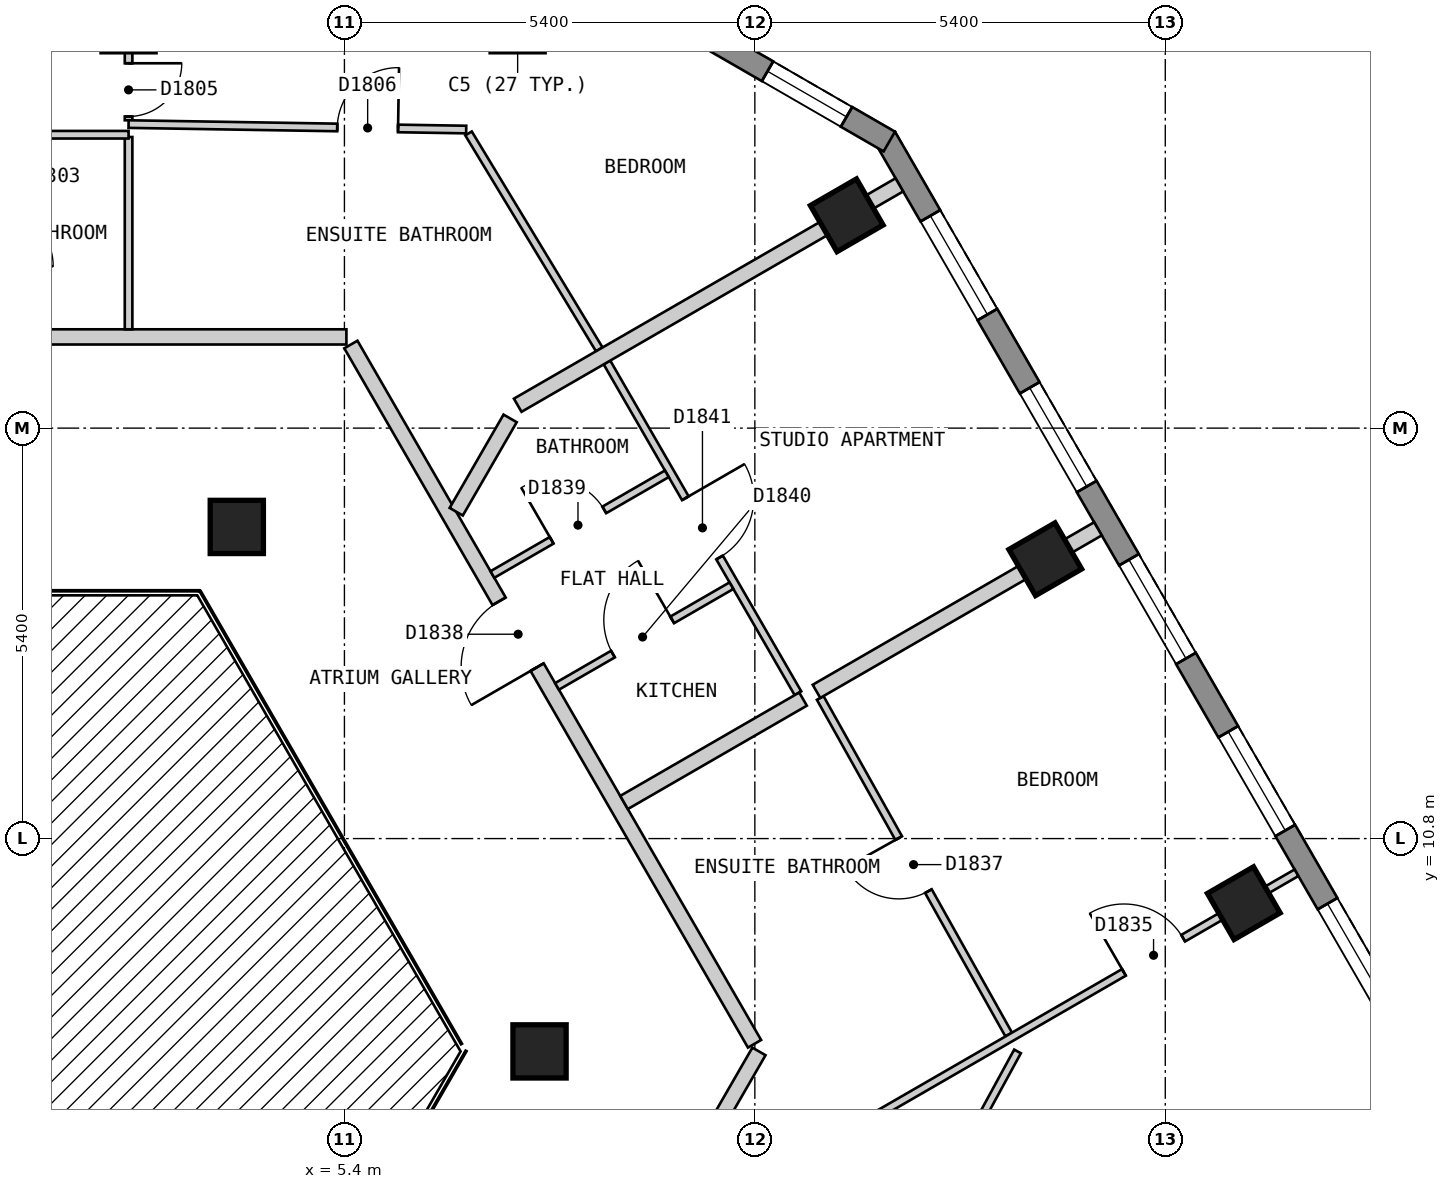
"""IFC4 building model, lengths in metres.
Left out: names, types, materials, properties, quantities, classifications, styles, units other than length and angle.
Written with IfcOpenShell. Run it as: python <this file> out.ifc"""

import sys

from ifc_helpers import new_model, si_unit, direction, frame, frame_2d, origin, origin_2d, place, context, subcontext, project, spatial, polyline, rectangle, outline, extrude, element, fill, save


model = new_model("IFC4")
c1 = context("Model", 3, precision=1e-05, world=origin(), true_north=direction((0.0, 1.0)))
c2 = subcontext(c1, "Body", "Model", "MODEL_VIEW")
j1 = project(units=[si_unit("LENGTHUNIT", "METRE"), si_unit("PLANEANGLEUNIT", "RADIAN")], contexts=[c1])
p1 = place(None, origin())
s1 = spatial("IfcSite", under=j1, at=p1, CompositionType="ELEMENT")
p2 = place(p1, origin())
s2 = spatial("IfcBuilding", under=s1, at=p2, CompositionType="ELEMENT")
p3 = place(p2, frame((0.0, 0.0, 208.8)))
s3 = spatial("IfcBuildingStorey", under=s2, at=p3, CompositionType="ELEMENT", Elevation=208.8)
for number, where, z_axis, x_axis in (
    (1, (17.233, 9.95, 0.0), (0.0, 0.0, 1.0), (-0.5, 0.866, 0.0)),
    (2, (14.621, 14.475, 0.0), (0.0, 0.0, 1.0), (-0.5, 0.866, 0.0)),
    (3, (12.009, 19.0, 0.0), (0.0, 0.0, 1.0), (-0.5, 0.866, 0.0)),
    (4, (7.967, 8.0, 0.0), (0.0, 0.0, 1.0), (1.0, 0.0, 0.0)),
    (5, (3.984, 14.9, 0.0), (0.0, 0.0, 1.0), (1.0, 0.0, 0.0)),
):
    element("IfcColumn", number, at=place(p3, frame(where, z_axis=z_axis, x_axis=x_axis)), inside=s3, PredefinedType="COLUMN", context=c2, shape_type="SweptSolid", body=[
        extrude(rectangle(XDim=0.7, YDim=0.7, at=origin_2d()), origin(), (0.0, 0.0, 1.0), 3.0),
    ])
p4 = place(p3, frame((23.599, 0.825, 0.0), z_axis=(0.0, 0.0, 1.0), x_axis=(-0.500003656944, 0.866023292436, 0.0)))
e6 = element("IfcWall", 6, at=p4, inside=s3, PredefinedType="SOLIDWALL", context=c2, shape_type="SweptSolid", body=[
    extrude(outline(polyline([(0.0, -0.15), (22.17, -0.15), (22.09, 0.15), (0.08, 0.15), (0.0, -0.15)])), origin(), (0.0, 0.0, 1.0), 2.7),
])
p5 = place(p4, frame((1.191, 0.0, 0.15)))
e7 = element("IfcOpeningElement", 7, at=p5, cuts=e6, PredefinedType="OPENING", context=c2, shape_type="SweptSolid", body=[
    extrude(rectangle(XDim=1.5, YDim=2.1, at=frame_2d((0.75, 1.05))), frame((0.0, 0.16, 0.0), z_axis=(0.0, -1.0, 0.0), x_axis=(1.0, 0.0, 0.0)), (0.0, 0.0, 1.0), 0.32),
])
p6 = place(p4, frame((3.804, 0.0, 0.15)))
e8 = element("IfcOpeningElement", 8, at=p6, cuts=e6, PredefinedType="OPENING", context=c2, shape_type="SweptSolid", body=[
    extrude(rectangle(XDim=1.5, YDim=2.1, at=frame_2d((0.75, 1.05))), frame((0.0, 0.16, 0.0), z_axis=(0.0, -1.0, 0.0), x_axis=(1.0, 0.0, 0.0)), (0.0, 0.0, 1.0), 0.32),
])
p7 = place(p4, frame((6.417, 0.0, 0.15)))
e9 = element("IfcOpeningElement", 9, at=p7, cuts=e6, PredefinedType="OPENING", context=c2, shape_type="SweptSolid", body=[
    extrude(rectangle(XDim=1.5, YDim=2.1, at=frame_2d((0.75, 1.05))), frame((0.0, 0.16, 0.0), z_axis=(0.0, -1.0, 0.0), x_axis=(1.0, 0.0, 0.0)), (0.0, 0.0, 1.0), 0.32),
])
p8 = place(p4, frame((9.029, 0.0, 0.15)))
e10 = element("IfcOpeningElement", 10, at=p8, cuts=e6, PredefinedType="OPENING", context=c2, shape_type="SweptSolid", body=[
    extrude(rectangle(XDim=1.5, YDim=2.1, at=frame_2d((0.75, 1.05))), frame((0.0, 0.16, 0.0), z_axis=(0.0, -1.0, 0.0), x_axis=(1.0, 0.0, 0.0)), (0.0, 0.0, 1.0), 0.32),
])
p9 = place(p4, frame((11.641, 0.0, 0.15)))
e11 = element("IfcOpeningElement", 11, at=p9, cuts=e6, PredefinedType="OPENING", context=c2, shape_type="SweptSolid", body=[
    extrude(rectangle(XDim=1.5, YDim=2.1, at=frame_2d((0.75, 1.05))), frame((0.0, 0.16, 0.0), z_axis=(0.0, -1.0, 0.0), x_axis=(1.0, 0.0, 0.0)), (0.0, 0.0, 1.0), 0.32),
])
p10 = place(p4, frame((14.254, 0.0, 0.15)))
e12 = element("IfcOpeningElement", 12, at=p10, cuts=e6, PredefinedType="OPENING", context=c2, shape_type="SweptSolid", body=[
    extrude(rectangle(XDim=1.5, YDim=2.1, at=frame_2d((0.75, 1.05))), frame((0.0, 0.16, 0.0), z_axis=(0.0, -1.0, 0.0), x_axis=(1.0, 0.0, 0.0)), (0.0, 0.0, 1.0), 0.32),
])
p11 = place(p4, frame((16.866, 0.0, 0.15)))
e13 = element("IfcOpeningElement", 13, at=p11, cuts=e6, PredefinedType="OPENING", context=c2, shape_type="SweptSolid", body=[
    extrude(rectangle(XDim=1.5, YDim=2.1, at=frame_2d((0.75, 1.05))), frame((0.0, 0.16, 0.0), z_axis=(0.0, -1.0, 0.0), x_axis=(1.0, 0.0, 0.0)), (0.0, 0.0, 1.0), 0.32),
])
p12 = place(p4, frame((19.479, 0.0, 0.15)))
e14 = element("IfcOpeningElement", 14, at=p12, cuts=e6, PredefinedType="OPENING", context=c2, shape_type="SweptSolid", body=[
    extrude(rectangle(XDim=1.5, YDim=2.1, at=frame_2d((0.75, 1.05))), frame((0.0, 0.16, 0.0), z_axis=(0.0, -1.0, 0.0), x_axis=(1.0, 0.0, 0.0)), (0.0, 0.0, 1.0), 0.32),
])
p13 = place(p3, frame((12.569, 19.97, 0.0), z_axis=(0.0, 0.0, 1.0), x_axis=(-0.866022959057, 0.500004234368, 0.0)))
e15 = element("IfcWall", 15, at=p13, inside=s3, PredefinedType="SOLIDWALL", context=c2, shape_type="SweptSolid", body=[
    extrude(outline(polyline([(0.0, -0.15), (5.0, -0.15), (4.92, 0.15), (0.08, 0.15), (0.0, -0.15)])), origin(), (0.0, 0.0, 1.0), 2.7),
])
p14 = place(p13, frame((0.65, 0.0, 0.15)))
e16 = element("IfcOpeningElement", 16, at=p14, cuts=e15, PredefinedType="OPENING", context=c2, shape_type="SweptSolid", body=[
    extrude(rectangle(XDim=1.2, YDim=2.1, at=frame_2d((0.6, 1.05))), frame((0.0, 0.16, 0.0), z_axis=(0.0, -1.0, 0.0), x_axis=(1.0, 0.0, 0.0)), (0.0, 0.0, 1.0), 0.32),
])
p15 = place(p13, frame((3.15, 0.0, 0.15)))
e17 = element("IfcOpeningElement", 17, at=p15, cuts=e15, PredefinedType="OPENING", context=c2, shape_type="SweptSolid", body=[
    extrude(rectangle(XDim=1.2, YDim=2.1, at=frame_2d((0.6, 1.05))), frame((0.0, 0.16, 0.0), z_axis=(0.0, -1.0, 0.0), x_axis=(1.0, 0.0, 0.0)), (0.0, 0.0, 1.0), 0.32),
])
p16 = place(p3, frame((5.485, 17.3, 0.0), z_axis=(0.0, 0.0, 1.0), x_axis=(0.499943285704, -0.866058145322, 0.0)))
e18 = element("IfcWall", 18, at=p16, inside=s3, PredefinedType="PARTITIONING", context=c2, shape_type="SweptSolid", body=[
    extrude(rectangle(XDim=10.623, YDim=0.2, at=frame_2d((5.312, 0.0))), origin(), (0.0, 0.0, 1.0), 2.7),
])
p17 = place(p16, frame((3.901, 0.0, 0.0)))
e19 = element("IfcOpeningElement", 19, at=p17, cuts=e18, PredefinedType="OPENING", context=c2, shape_type="SweptSolid", body=[
    extrude(rectangle(XDim=1.0, YDim=2.1, at=frame_2d((0.5, 1.05))), frame((0.0, 0.11, 0.0), z_axis=(0.0, -1.0, 0.0), x_axis=(1.0, 0.0, 0.0)), (0.0, 0.0, 1.0), 0.22),
])
p18 = place(p3, frame((-5.311, 17.4, 0.0), z_axis=(0.0, 0.0, 1.0), x_axis=(1.0, 0.0, 0.0)))
e20 = element("IfcWall", 20, at=p18, inside=s3, PredefinedType="PARTITIONING", context=c2, shape_type="SweptSolid", body=[
    extrude(rectangle(XDim=10.737, YDim=0.2, at=frame_2d((5.369, 0.0))), origin(), (0.0, 0.0, 1.0), 2.7),
])
p19 = place(p18, frame((4.812, 0.0, 0.0)))
e21 = element("IfcOpeningElement", 21, at=p19, cuts=e20, PredefinedType="OPENING", context=c2, shape_type="SweptSolid", body=[
    extrude(rectangle(XDim=1.0, YDim=2.1, at=frame_2d((0.5, 1.05))), frame((0.0, 0.11, 0.0), z_axis=(0.0, -1.0, 0.0), x_axis=(1.0, 0.0, 0.0)), (0.0, 0.0, 1.0), 0.22),
])
p20 = place(p3, frame((9.404, 5.487, 0.0), z_axis=(0.0, 0.0, 1.0), x_axis=(0.499768590677, 0.866158966803, 0.0)))
e22 = element("IfcWall", 22, at=p20, inside=s3, PredefinedType="PARTITIONING", context=c2, shape_type="SweptSolid", body=[
    extrude(rectangle(XDim=2.901, YDim=0.2, at=frame_2d((1.451, 0.0))), origin(), (0.0, 0.0, 1.0), 2.7),
])
p21 = place(p3, frame((7.033, 20.077, 0.0), z_axis=(0.0, 0.0, 1.0), x_axis=(0.517918779664, -0.855429797044, 0.0)))
e23 = element("IfcWall", 23, at=p21, inside=s3, PredefinedType="PARTITIONING", context=c2, shape_type="SweptSolid", body=[
    extrude(rectangle(XDim=3.321, YDim=0.1, at=frame_2d((1.661, 0.0))), origin(), (0.0, 0.0, 1.0), 2.7),
])
p22 = place(p3, frame((8.854, 17.064, 0.0), z_axis=(0.0, 0.0, 1.0), x_axis=(0.500042049778, -0.866001124973, 0.0)))
e24 = element("IfcWall", 24, at=p22, inside=s3, PredefinedType="PARTITIONING", context=c2, shape_type="SweptSolid", body=[
    extrude(rectangle(XDim=5.025, YDim=0.1, at=frame_2d((2.513, 0.0))), origin(), (0.0, 0.0, 1.0), 2.7),
])
p23 = place(p22, frame((2.063, 0.0, 0.0)))
e25 = element("IfcOpeningElement", 25, at=p23, cuts=e24, PredefinedType="OPENING", context=c2, shape_type="SweptSolid", body=[
    extrude(rectangle(XDim=0.9, YDim=2.1, at=frame_2d((0.45, 1.05))), frame((0.0, 0.06, 0.0), z_axis=(0.0, -1.0, 0.0), x_axis=(1.0, 0.0, 0.0)), (0.0, 0.0, 1.0), 0.12),
])
p24 = place(p3, frame((11.66, 12.65, 0.0), z_axis=(0.0, 0.0, 1.0), x_axis=(0.488650242737, -0.872479764965, 0.0)))
e26 = element("IfcWall", 26, at=p24, inside=s3, PredefinedType="PARTITIONING", context=c2, shape_type="SweptSolid", body=[
    extrude(rectangle(XDim=5.075, YDim=0.1, at=frame_2d((2.538, 0.0))), origin(), (0.0, 0.0, 1.0), 2.7),
])
p25 = place(p24, frame((2.113, 0.0, 0.0)))
e27 = element("IfcOpeningElement", 27, at=p25, cuts=e26, PredefinedType="OPENING", context=c2, shape_type="SweptSolid", body=[
    extrude(rectangle(XDim=0.8, YDim=2.1, at=frame_2d((0.4, 1.05))), frame((0.0, 0.06, 0.0), z_axis=(0.0, -1.0, 0.0), x_axis=(1.0, 0.0, 0.0)), (0.0, 0.0, 1.0), 0.12),
])
p26 = place(p3, frame((2.56, 22.3, 0.0), z_axis=(0.0, 0.0, 1.0), x_axis=(0.0, -1.0, 0.0)))
e28 = element("IfcWall", 28, at=p26, inside=s3, PredefinedType="PARTITIONING", context=c2, shape_type="SweptSolid", body=[
    extrude(rectangle(XDim=2.05, YDim=0.1, at=frame_2d((1.025, 0.0))), origin(), (0.0, 0.0, 1.0), 2.7),
])
p27 = place(p26, frame((1.3, 0.0, 0.0)))
e29 = element("IfcOpeningElement", 29, at=p27, cuts=e28, PredefinedType="OPENING", context=c2, shape_type="SweptSolid", body=[
    extrude(rectangle(XDim=0.7, YDim=2.1, at=frame_2d((0.35, 1.05))), frame((0.0, 0.06, 0.0), z_axis=(0.0, -1.0, 0.0), x_axis=(1.0, 0.0, 0.0)), (0.0, 0.0, 1.0), 0.12),
])
p28 = place(p3, frame((2.56, 20.03, 0.0), z_axis=(0.0, 0.0, 1.0), x_axis=(0.0, -1.0, 0.0)))
e30 = element("IfcWall", 30, at=p28, inside=s3, PredefinedType="PARTITIONING", context=c2, shape_type="SweptSolid", body=[
    extrude(rectangle(XDim=2.53, YDim=0.1, at=frame_2d((1.265, 0.0))), origin(), (0.0, 0.0, 1.0), 2.7),
])
p29 = place(p3, frame((2.56, 20.2, 0.0), z_axis=(0.0, 0.0, 1.0), x_axis=(0.999868576801, -0.016212005615, 0.0)))
e31 = element("IfcWall", 31, at=p29, inside=s3, PredefinedType="PARTITIONING", context=c2, shape_type="SweptSolid", body=[
    extrude(rectangle(XDim=4.442, YDim=0.1, at=frame_2d((2.221, 0.0))), origin(), (0.0, 0.0, 1.0), 2.7),
])
p30 = place(p29, frame((2.746, 0.0, 0.0)))
e32 = element("IfcOpeningElement", 32, at=p30, cuts=e31, PredefinedType="OPENING", context=c2, shape_type="SweptSolid", body=[
    extrude(rectangle(XDim=0.8, YDim=2.1, at=frame_2d((0.4, 1.05))), frame((0.0, 0.06, 0.0), z_axis=(0.0, -1.0, 0.0), x_axis=(1.0, 0.0, 0.0)), (0.0, 0.0, 1.0), 0.12),
])
p31 = place(p3, frame((-0.716, 20.06, 0.0), z_axis=(0.0, 0.0, 1.0), x_axis=(1.0, 0.0, 0.0)))
e33 = element("IfcWall", 33, at=p31, inside=s3, PredefinedType="PARTITIONING", context=c2, shape_type="SweptSolid", body=[
    extrude(rectangle(XDim=3.276, YDim=0.1, at=frame_2d((1.638, 0.0))), origin(), (0.0, 0.0, 1.0), 2.7),
])
p32 = place(p3, frame((12.729, 5.201, 0.0), z_axis=(0.0, 0.0, 1.0), x_axis=(0.478932598182, 0.877851676764, 0.0)))
e34 = element("IfcWall", 34, at=p32, inside=s3, PredefinedType="PARTITIONING", context=c2, shape_type="SweptSolid", body=[
    extrude(rectangle(XDim=3.188, YDim=0.1, at=frame_2d((1.594, 0.0))), origin(), (0.0, 0.0, 1.0), 2.7),
])
p33 = place(p3, frame((9.354, 5.401, 0.0), z_axis=(0.0, 0.0, 1.0), x_axis=(0.866018411306, 0.500012111133, 0.0)))
e35 = element("IfcWall", 35, at=p33, inside=s3, PredefinedType="PARTITIONING", context=c2, shape_type="SweptSolid", body=[
    extrude(rectangle(XDim=9.898, YDim=0.1, at=frame_2d((4.949, 0.0))), origin(), (0.0, 0.0, 1.0), 2.7),
])
p34 = place(p33, frame((7.277, 0.0, 0.0)))
e36 = element("IfcOpeningElement", 36, at=p34, cuts=e35, PredefinedType="OPENING", context=c2, shape_type="SweptSolid", body=[
    extrude(rectangle(XDim=0.9, YDim=2.1, at=frame_2d((0.45, 1.05))), frame((0.0, 0.06, 0.0), z_axis=(0.0, -1.0, 0.0), x_axis=(1.0, 0.0, 0.0)), (0.0, 0.0, 1.0), 0.12),
])
p35 = place(p3, frame((8.197, 12.802, 0.0), z_axis=(0.0, 0.0, 1.0), x_axis=(0.866029095148, 0.499993606316, 0.0)))
e37 = element("IfcWall", 37, at=p35, inside=s3, PredefinedType="PARTITIONING", context=c2, shape_type="SweptSolid", body=[
    extrude(rectangle(XDim=2.65, YDim=0.1, at=frame_2d((1.325, 0.0))), origin(), (0.0, 0.0, 1.0), 2.7),
])
p36 = place(p35, frame((0.85, 0.0, 0.0)))
e38 = element("IfcOpeningElement", 38, at=p36, cuts=e37, PredefinedType="OPENING", context=c2, shape_type="SweptSolid", body=[
    extrude(rectangle(XDim=0.9, YDim=2.1, at=frame_2d((0.45, 1.05))), frame((0.0, 0.06, 0.0), z_axis=(0.0, -1.0, 0.0), x_axis=(1.0, 0.0, 0.0)), (0.0, 0.0, 1.0), 0.12),
])
p37 = place(p3, frame((7.347, 14.274, 0.0), z_axis=(0.0, 0.0, 1.0), x_axis=(0.86601223543, 0.500022807565, 0.0)))
e39 = element("IfcWall", 39, at=p37, inside=s3, PredefinedType="PARTITIONING", context=c2, shape_type="SweptSolid", body=[
    extrude(rectangle(XDim=2.65, YDim=0.1, at=frame_2d((1.325, 0.0))), origin(), (0.0, 0.0, 1.0), 2.7),
])
p38 = place(p37, frame((0.9, 0.0, 0.0)))
e40 = element("IfcOpeningElement", 40, at=p38, cuts=e39, PredefinedType="OPENING", context=c2, shape_type="SweptSolid", body=[
    extrude(rectangle(XDim=0.8, YDim=2.1, at=frame_2d((0.4, 1.05))), frame((0.0, 0.06, 0.0), z_axis=(0.0, -1.0, 0.0), x_axis=(1.0, 0.0, 0.0)), (0.0, 0.0, 1.0), 0.12),
])
p39 = place(p3, frame((6.871, 15.1, 0.0), z_axis=(0.0, 0.0, 1.0), x_axis=(0.50006528296, 0.865987709369, 0.0)))
e41 = element("IfcWall", 41, at=p39, inside=s3, PredefinedType="PARTITIONING", context=c2, shape_type="SweptSolid", body=[
    extrude(rectangle(XDim=1.418, YDim=0.2, at=frame_2d((0.709, 0.0))), origin(), (0.0, 0.0, 1.0), 2.7),
])
p40 = place(p3, frame((9.079, 11.275, 0.0), z_axis=(0.0, 0.0, 1.0), x_axis=(0.865952340496, 0.500126527981, 0.0)))
e42 = element("IfcWall", 42, at=p40, inside=s3, PredefinedType="PARTITIONING", context=c2, shape_type="SweptSolid", body=[
    extrude(rectangle(XDim=2.719, YDim=0.2, at=frame_2d((1.36, 0.0))), origin(), (0.0, 0.0, 1.0), 2.7),
])
p41 = place(p3, frame((11.611, 12.737, 0.0), z_axis=(0.0, 0.0, 1.0), x_axis=(0.866017282483, 0.500014066243, 0.0)))
e43 = element("IfcWall", 43, at=p41, inside=s3, PredefinedType="PARTITIONING", context=c2, shape_type="SweptSolid", body=[
    extrude(rectangle(XDim=4.276, YDim=0.2, at=frame_2d((2.138, 0.0))), origin(), (0.0, 0.0, 1.0), 2.7),
])
p42 = place(p3, frame((7.68, 16.501, 0.0), z_axis=(0.0, 0.0, 1.0), x_axis=(0.86602149507, 0.500006770031, 0.0)))
e44 = element("IfcWall", 44, at=p42, inside=s3, PredefinedType="PARTITIONING", context=c2, shape_type="SweptSolid", body=[
    extrude(rectangle(XDim=5.798, YDim=0.2, at=frame_2d((2.899, 0.0))), origin(), (0.0, 0.0, 1.0), 2.7),
])
p43 = place(p8, origin())
e45 = element("IfcWindow", 45, at=p43, inside=s3, PartitioningType="SINGLE_PANEL", PredefinedType="WINDOW", context=c2, shape_type="SweptSolid", body=[
    extrude(rectangle(XDim=1.5, YDim=2.1, at=frame_2d((0.75, 1.05))), frame((0.0, 0.03, 0.0), z_axis=(0.0, -1.0, 0.0), x_axis=(1.0, 0.0, 0.0)), (0.0, 0.0, 1.0), 0.06),
])
fill(e10, e45)
p44 = place(p9, origin())
e46 = element("IfcWindow", 46, at=p44, inside=s3, PartitioningType="SINGLE_PANEL", PredefinedType="WINDOW", context=c2, shape_type="SweptSolid", body=[
    extrude(rectangle(XDim=1.5, YDim=2.1, at=frame_2d((0.75, 1.05))), frame((0.0, 0.03, 0.0), z_axis=(0.0, -1.0, 0.0), x_axis=(1.0, 0.0, 0.0)), (0.0, 0.0, 1.0), 0.06),
])
fill(e11, e46)
p45 = place(p10, origin())
e47 = element("IfcWindow", 47, at=p45, inside=s3, PartitioningType="SINGLE_PANEL", PredefinedType="WINDOW", context=c2, shape_type="SweptSolid", body=[
    extrude(rectangle(XDim=1.5, YDim=2.1, at=frame_2d((0.75, 1.05))), frame((0.0, 0.03, 0.0), z_axis=(0.0, -1.0, 0.0), x_axis=(1.0, 0.0, 0.0)), (0.0, 0.0, 1.0), 0.06),
])
fill(e12, e47)
p46 = place(p11, origin())
e48 = element("IfcWindow", 48, at=p46, inside=s3, PartitioningType="SINGLE_PANEL", PredefinedType="WINDOW", context=c2, shape_type="SweptSolid", body=[
    extrude(rectangle(XDim=1.5, YDim=2.1, at=frame_2d((0.75, 1.05))), frame((0.0, 0.03, 0.0), z_axis=(0.0, -1.0, 0.0), x_axis=(1.0, 0.0, 0.0)), (0.0, 0.0, 1.0), 0.06),
])
fill(e13, e48)
p47 = place(p12, origin())
e49 = element("IfcWindow", 49, at=p47, inside=s3, PartitioningType="SINGLE_PANEL", PredefinedType="WINDOW", context=c2, shape_type="SweptSolid", body=[
    extrude(rectangle(XDim=1.5, YDim=2.1, at=frame_2d((0.75, 1.05))), frame((0.0, 0.03, 0.0), z_axis=(0.0, -1.0, 0.0), x_axis=(1.0, 0.0, 0.0)), (0.0, 0.0, 1.0), 0.06),
])
fill(e14, e49)
p48 = place(p14, origin())
e50 = element("IfcWindow", 50, at=p48, inside=s3, PartitioningType="SINGLE_PANEL", PredefinedType="WINDOW", context=c2, shape_type="SweptSolid", body=[
    extrude(rectangle(XDim=1.2, YDim=2.1, at=frame_2d((0.6, 1.05))), frame((0.0, 0.03, 0.0), z_axis=(0.0, -1.0, 0.0), x_axis=(1.0, 0.0, 0.0)), (0.0, 0.0, 1.0), 0.06),
])
fill(e16, e50)
p49 = place(p27, origin())
e51 = element("IfcDoor", 51, at=p49, inside=s3, OperationType="SINGLE_SWING_LEFT", PredefinedType="DOOR", context=c2, shape_type="SweptSolid", body=[
    extrude(rectangle(XDim=0.7, YDim=2.1, at=frame_2d((0.35, 1.05))), frame((0.0, 0.025, 0.0), z_axis=(0.0, -1.0, 0.0), x_axis=(1.0, 0.0, 0.0)), (0.0, 0.0, 1.0), 0.05),
])
fill(e29, e51)
p50 = place(p30, origin())
e52 = element("IfcDoor", 52, at=p50, inside=s3, OperationType="SINGLE_SWING_RIGHT", PredefinedType="DOOR", context=c2, shape_type="SweptSolid", body=[
    extrude(rectangle(XDim=0.8, YDim=2.1, at=frame_2d((0.4, 1.05))), frame((0.0, 0.025, 0.0), z_axis=(0.0, -1.0, 0.0), x_axis=(1.0, 0.0, 0.0)), (0.0, 0.0, 1.0), 0.05),
])
fill(e32, e52)
p51 = place(p34, origin())
e53 = element("IfcDoor", 53, at=p51, inside=s3, OperationType="SINGLE_SWING_LEFT", PredefinedType="DOOR", context=c2, shape_type="SweptSolid", body=[
    extrude(rectangle(XDim=0.9, YDim=2.1, at=frame_2d((0.45, 1.05))), frame((0.0, 0.025, 0.0), z_axis=(0.0, -1.0, 0.0), x_axis=(1.0, 0.0, 0.0)), (0.0, 0.0, 1.0), 0.05),
])
fill(e36, e53)
p52 = place(p25, origin())
e54 = element("IfcDoor", 54, at=p52, inside=s3, OperationType="SINGLE_SWING_LEFT", PredefinedType="DOOR", context=c2, shape_type="SweptSolid", body=[
    extrude(rectangle(XDim=0.8, YDim=2.1, at=frame_2d((0.4, 1.05))), frame((0.0, 0.025, 0.0), z_axis=(0.0, -1.0, 0.0), x_axis=(1.0, 0.0, 0.0)), (0.0, 0.0, 1.0), 0.05),
])
fill(e27, e54)
p53 = place(p17, origin())
e55 = element("IfcDoor", 55, at=p53, inside=s3, OperationType="SINGLE_SWING_RIGHT", PredefinedType="DOOR", context=c2, shape_type="SweptSolid", body=[
    extrude(rectangle(XDim=1.0, YDim=2.1, at=frame_2d((0.5, 1.05))), frame((0.0, 0.025, 0.0), z_axis=(0.0, -1.0, 0.0), x_axis=(1.0, 0.0, 0.0)), (0.0, 0.0, 1.0), 0.05),
])
fill(e19, e55)
p54 = place(p38, origin())
e56 = element("IfcDoor", 56, at=p54, inside=s3, OperationType="SINGLE_SWING_LEFT", PredefinedType="DOOR", context=c2, shape_type="SweptSolid", body=[
    extrude(rectangle(XDim=0.8, YDim=2.1, at=frame_2d((0.4, 1.05))), frame((0.0, 0.025, 0.0), z_axis=(0.0, -1.0, 0.0), x_axis=(1.0, 0.0, 0.0)), (0.0, 0.0, 1.0), 0.05),
])
fill(e40, e56)
p55 = place(p36, origin())
e57 = element("IfcDoor", 57, at=p55, inside=s3, OperationType="SINGLE_SWING_RIGHT", PredefinedType="DOOR", context=c2, shape_type="SweptSolid", body=[
    extrude(rectangle(XDim=0.9, YDim=2.1, at=frame_2d((0.45, 1.05))), frame((0.0, 0.025, 0.0), z_axis=(0.0, -1.0, 0.0), x_axis=(1.0, 0.0, 0.0)), (0.0, 0.0, 1.0), 0.05),
])
fill(e38, e57)
p56 = place(p23, origin())
e58 = element("IfcDoor", 58, at=p56, inside=s3, OperationType="SINGLE_SWING_LEFT", PredefinedType="DOOR", context=c2, shape_type="SweptSolid", body=[
    extrude(rectangle(XDim=0.9, YDim=2.1, at=frame_2d((0.45, 1.05))), frame((0.0, 0.025, 0.0), z_axis=(0.0, -1.0, 0.0), x_axis=(1.0, 0.0, 0.0)), (0.0, 0.0, 1.0), 0.05),
])
fill(e25, e58)
save(model, sys.argv[1])
